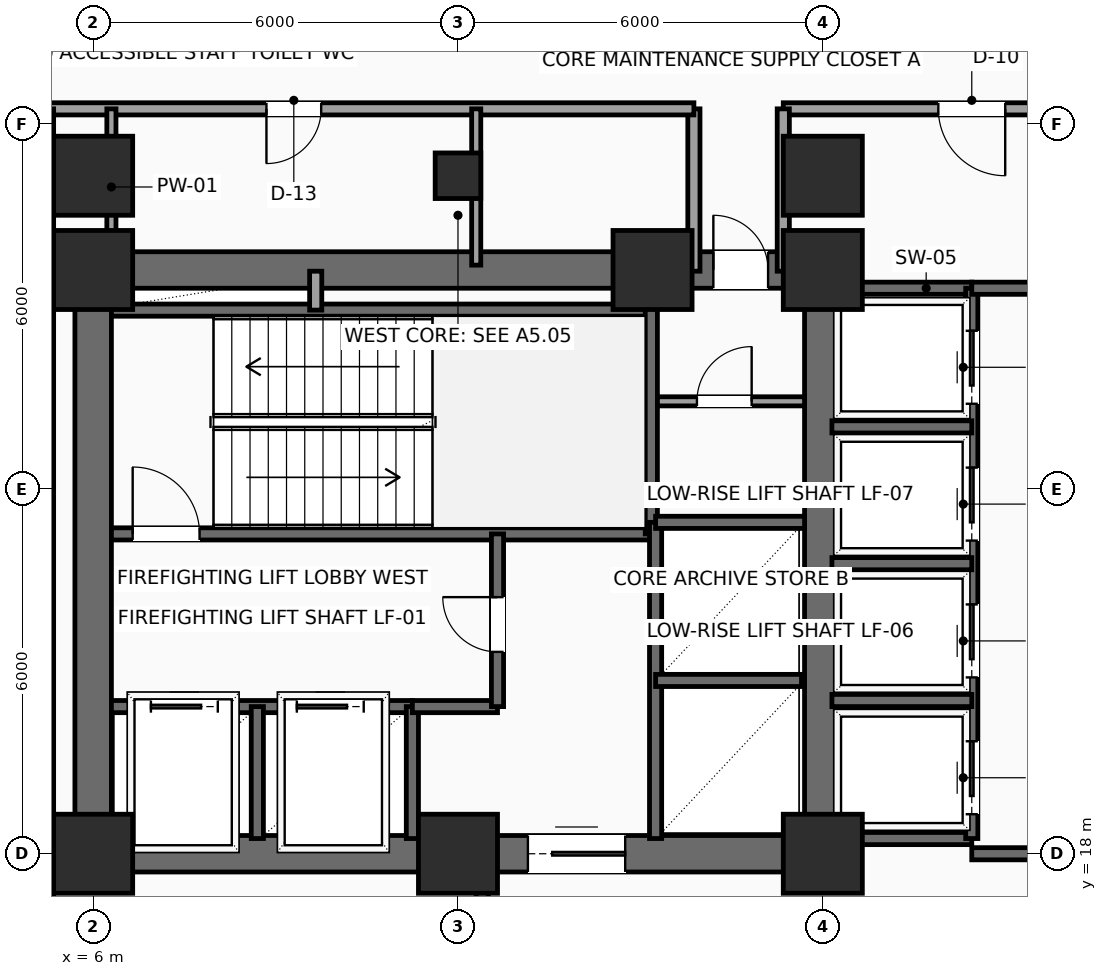
"""IFC4 building model, lengths in metres.
Left out: names, types, materials, properties, quantities, classifications, styles, units other than length and angle.
Written with IfcOpenShell. Run it as: python <this file> out.ifc"""

import sys

from ifc_helpers import new_model, si_unit, direction, frame, frame_2d, origin, origin_2d, place, context, subcontext, project, spatial, rectangle, hollow_rectangle, extrude, element, fill, save


model = new_model("IFC4")
c1 = context("Model", 3, precision=1e-05, world=origin(), true_north=direction((0.0, 1.0)))
c2 = subcontext(c1, "Body", "Model", "MODEL_VIEW")
j1 = project(units=[si_unit("LENGTHUNIT", "METRE"), si_unit("PLANEANGLEUNIT", "RADIAN")], contexts=[c1])
p1 = place(None, origin())
s1 = spatial("IfcSite", under=j1, at=p1, CompositionType="ELEMENT")
p2 = place(p1, origin())
s2 = spatial("IfcBuilding", under=s1, at=p2, CompositionType="ELEMENT")
p3 = place(p2, frame((0.0, 0.0, 83.1)))
s3 = spatial("IfcBuildingStorey", under=s2, at=p3, CompositionType="ELEMENT", Elevation=83.1)
for number, where, z_axis, x_axis in (
    (1, (6.0, 18.0, 0.0), (0.0, 0.0, 1.0), (1.0, 0.0, 0.0)),
    (2, (12.0, 18.0, 0.0), (0.0, 0.0, 1.0), (1.0, 0.0, 0.0)),
    (3, (18.0, 18.0, 0.0), (0.0, 0.0, 1.0), (1.0, 0.0, 0.0)),
    (4, (6.0, 27.6, 0.0), (0.0, 0.0, 1.0), (1.0, 0.0, 0.0)),
    (5, (15.2, 27.6, 0.0), (0.0, 0.0, 1.0), (1.0, 0.0, 0.0)),
    (6, (18.0, 27.6, 0.0), (0.0, 0.0, 1.0), (1.0, 0.0, 0.0)),
    (7, (6.0, 29.15, 0.0), (0.0, 0.0, 1.0), (1.0, 0.0, 0.0)),
):
    element("IfcColumn", number, at=place(p3, frame(where, z_axis=z_axis, x_axis=x_axis)), inside=s3, PredefinedType="COLUMN", context=c2, shape_type="SweptSolid", body=[
        extrude(rectangle(XDim=1.3, YDim=1.3, at=origin_2d()), origin(), (0.0, 0.0, 1.0), 3.9),
    ])
p4 = place(p3, frame((12.0, 29.15, 0.0), z_axis=(0.0, 0.0, 1.0), x_axis=(1.0, 0.0, 0.0)))
e8 = element("IfcColumn", 8, at=p4, inside=s3, PredefinedType="COLUMN", context=c2, shape_type="SweptSolid", body=[
    extrude(hollow_rectangle(XDim=0.75, YDim=0.75, WallThickness=0.035, InnerFilletRadius=0.035, OuterFilletRadius=0.05, at=origin_2d()), origin(), (0.0, 0.0, 1.0), 3.9),
])
p5 = place(p3, frame((18.0, 29.15, 0.0), z_axis=(0.0, 0.0, 1.0), x_axis=(1.0, 0.0, 0.0)))
e9 = element("IfcColumn", 9, at=p5, inside=s3, PredefinedType="COLUMN", context=c2, shape_type="SweptSolid", body=[
    extrude(rectangle(XDim=1.3, YDim=1.3, at=origin_2d()), origin(), (0.0, 0.0, 1.0), 3.9),
])
p6 = place(p3, frame((6.0, 18.0, 0.0), z_axis=(0.0, 0.0, 1.0), x_axis=(1.0, 0.0, 0.0)))
e10 = element("IfcWall", 10, at=p6, inside=s3, PredefinedType="SHEAR", context=c2, shape_type="SweptSolid", body=[
    extrude(rectangle(XDim=12.0, YDim=0.6, at=frame_2d((6.0, 0.0))), origin(), (0.0, 0.0, 1.0), 3.65),
])
p7 = place(p6, frame((7.15, 0.0, 0.0)))
e11 = element("IfcOpeningElement", 11, at=p7, cuts=e10, PredefinedType="OPENING", context=c2, shape_type="SweptSolid", body=[
    extrude(rectangle(XDim=1.6, YDim=2.3, at=frame_2d((0.8, 1.15))), frame((0.0, 0.31, 0.0), z_axis=(0.0, -1.0, 0.0), x_axis=(1.0, 0.0, 0.0)), (0.0, 0.0, 1.0), 0.62),
])
p8 = place(p3, frame((6.0, 27.6, 0.0), z_axis=(0.0, 0.0, 1.0), x_axis=(1.0, 0.0, 0.0)))
e12 = element("IfcWall", 12, at=p8, inside=s3, PredefinedType="SHEAR", context=c2, shape_type="SweptSolid", body=[
    extrude(rectangle(XDim=12.0, YDim=0.6, at=frame_2d((6.0, 0.0))), origin(), (0.0, 0.0, 1.0), 3.65),
])
p9 = place(p8, frame((10.2, 0.0, 0.0)))
e13 = element("IfcOpeningElement", 13, at=p9, cuts=e12, PredefinedType="OPENING", context=c2, shape_type="SweptSolid", body=[
    extrude(rectangle(XDim=0.9, YDim=2.15, at=frame_2d((0.45, 1.075))), frame((0.0, 0.31, 0.0), z_axis=(0.0, -1.0, 0.0), x_axis=(1.0, 0.0, 0.0)), (0.0, 0.0, 1.0), 0.62),
])
for number, where, z_axis, x_axis in (
    (14, (6.0, 18.0, 0.0), (0.0, 0.0, 1.0), (0.0, 1.0, 0.0)),
    (15, (18.0, 18.0, 0.0), (0.0, 0.0, 1.0), (0.0, 1.0, 0.0)),
):
    element("IfcWall", number, at=place(p3, frame(where, z_axis=z_axis, x_axis=x_axis)), inside=s3, PredefinedType="SHEAR", context=c2, shape_type="SweptSolid", body=[
        extrude(rectangle(XDim=9.6, YDim=0.6, at=frame_2d((4.8, 0.0))), origin(), (0.0, 0.0, 1.0), 3.65),
    ])
p10 = place(p3, frame((6.3, 23.26, 0.0), z_axis=(0.0, 0.0, 1.0), x_axis=(1.0, 0.0, 0.0)))
e16 = element("IfcWall", 16, at=p10, inside=s3, PredefinedType="SHEAR", context=c2, shape_type="SweptSolid", body=[
    extrude(rectangle(XDim=8.88, YDim=0.2, at=frame_2d((4.44, 0.0))), origin(), (0.0, 0.0, 1.0), 3.65),
])
p11 = place(p10, frame((0.35, 0.0, 0.0)))
e17 = element("IfcOpeningElement", 17, at=p11, cuts=e16, PredefinedType="OPENING", context=c2, shape_type="SweptSolid", body=[
    extrude(rectangle(XDim=1.1, YDim=2.2, at=frame_2d((0.55, 1.1))), frame((0.0, 0.11, 0.0), z_axis=(0.0, -1.0, 0.0), x_axis=(1.0, 0.0, 0.0)), (0.0, 0.0, 1.0), 0.22),
])
p12 = place(p3, frame((6.3, 26.94, 0.0), z_axis=(0.0, 0.0, 1.0), x_axis=(1.0, 0.0, 0.0)))
e18 = element("IfcWall", 18, at=p12, inside=s3, PredefinedType="SHEAR", context=c2, shape_type="SweptSolid", body=[
    extrude(rectangle(XDim=8.88, YDim=0.2, at=frame_2d((4.44, 0.0))), origin(), (0.0, 0.0, 1.0), 3.65),
])
p13 = place(p3, frame((15.18, 23.26, 0.0), z_axis=(0.0, 0.0, 1.0), x_axis=(0.0, 1.0, 0.0)))
e19 = element("IfcWall", 19, at=p13, inside=s3, PredefinedType="SHEAR", context=c2, shape_type="SweptSolid", body=[
    extrude(rectangle(XDim=4.04, YDim=0.2, at=frame_2d((2.02, 0.0))), origin(), (0.0, 0.0, 1.0), 3.65),
])
p14 = place(p3, frame((6.3, 20.42, 0.0), z_axis=(0.0, 0.0, 1.0), x_axis=(1.0, 0.0, 0.0)))
e20 = element("IfcWall", 20, at=p14, inside=s3, PredefinedType="SHEAR", context=c2, shape_type="SweptSolid", body=[
    extrude(rectangle(XDim=4.95, YDim=0.2, at=frame_2d((2.475, 0.0))), origin(), (0.0, 0.0, 1.0), 3.65),
])
p15 = place(p14, frame((0.65, 0.0, 0.0)))
e21 = element("IfcOpeningElement", 21, at=p15, cuts=e20, PredefinedType="OPENING", context=c2, shape_type="SweptSolid", body=[
    extrude(rectangle(XDim=1.1, YDim=2.2, at=frame_2d((0.55, 1.1))), frame((0.0, 0.11, 0.0), z_axis=(0.0, -1.0, 0.0), x_axis=(1.0, 0.0, 0.0)), (0.0, 0.0, 1.0), 0.22),
])
p16 = place(p14, frame((3.05, 0.0, 0.0)))
e22 = element("IfcOpeningElement", 22, at=p16, cuts=e20, PredefinedType="OPENING", context=c2, shape_type="SweptSolid", body=[
    extrude(rectangle(XDim=1.1, YDim=2.2, at=frame_2d((0.55, 1.1))), frame((0.0, 0.11, 0.0), z_axis=(0.0, -1.0, 0.0), x_axis=(1.0, 0.0, 0.0)), (0.0, 0.0, 1.0), 0.22),
])
for number, where, z_axis, x_axis in (
    (23, (8.7, 18.25, 0.0), (0.0, 0.0, 1.0), (0.0, 1.0, 0.0)),
    (24, (11.25, 18.25, 0.0), (0.0, 0.0, 1.0), (0.0, 1.0, 0.0)),
):
    element("IfcWall", number, at=place(p3, frame(where, z_axis=z_axis, x_axis=x_axis)), inside=s3, PredefinedType="SHEAR", context=c2, shape_type="SweptSolid", body=[
        extrude(rectangle(XDim=2.17, YDim=0.2, at=frame_2d((1.085, 0.0))), origin(), (0.0, 0.0, 1.0), 3.65),
    ])
p17 = place(p3, frame((11.25, 20.42, 0.0), z_axis=(0.0, 0.0, 1.0), x_axis=(1.0, 0.0, 0.0)))
e25 = element("IfcWall", 25, at=p17, inside=s3, PredefinedType="SHEAR", context=c2, shape_type="SweptSolid", body=[
    extrude(rectangle(XDim=1.4, YDim=0.2, at=frame_2d((0.7, 0.0))), origin(), (0.0, 0.0, 1.0), 3.65),
])
p18 = place(p3, frame((12.65, 20.42, 0.0), z_axis=(0.0, 0.0, 1.0), x_axis=(0.0, 1.0, 0.0)))
e26 = element("IfcWall", 26, at=p18, inside=s3, PredefinedType="SHEAR", context=c2, shape_type="SweptSolid", body=[
    extrude(rectangle(XDim=2.84, YDim=0.2, at=frame_2d((1.42, 0.0))), origin(), (0.0, 0.0, 1.0), 3.65),
])
p19 = place(p18, frame((0.9, 0.0, 0.0)))
e27 = element("IfcOpeningElement", 27, at=p19, cuts=e26, PredefinedType="OPENING", context=c2, shape_type="SweptSolid", body=[
    extrude(rectangle(XDim=0.9, YDim=2.15, at=frame_2d((0.45, 1.075))), frame((0.0, 0.11, 0.0), z_axis=(0.0, -1.0, 0.0), x_axis=(1.0, 0.0, 0.0)), (0.0, 0.0, 1.0), 0.22),
])
p20 = place(p3, frame((9.66, 26.94, 0.0), z_axis=(0.0, 0.0, 1.0), x_axis=(0.0, 1.0, 0.0)))
e28 = element("IfcWall", 28, at=p20, inside=s3, PredefinedType="SOLIDWALL", context=c2, shape_type="SweptSolid", body=[
    extrude(rectangle(XDim=0.64, YDim=0.2, at=frame_2d((0.32, 0.0))), origin(), (0.0, 0.0, 1.0), 3.65),
])
p21 = place(p3, frame((15.25, 18.25, 0.0), z_axis=(0.0, 0.0, 1.0), x_axis=(0.0, 1.0, 0.0)))
e29 = element("IfcWall", 29, at=p21, inside=s3, PredefinedType="SHEAR", context=c2, shape_type="SweptSolid", body=[
    extrude(rectangle(XDim=5.2, YDim=0.2, at=frame_2d((2.6, 0.0))), origin(), (0.0, 0.0, 1.0), 3.65),
])
p22 = place(p3, frame((15.25, 20.85, 0.0), z_axis=(0.0, 0.0, 1.0), x_axis=(1.0, 0.0, 0.0)))
e30 = element("IfcWall", 30, at=p22, inside=s3, PredefinedType="SHEAR", context=c2, shape_type="SweptSolid", body=[
    extrude(rectangle(XDim=2.4, YDim=0.2, at=frame_2d((1.2, 0.0))), origin(), (0.0, 0.0, 1.0), 3.65),
])
p23 = place(p3, frame((15.25, 23.45, 0.0), z_axis=(0.0, 0.0, 1.0), x_axis=(1.0, 0.0, 0.0)))
e31 = element("IfcWall", 31, at=p23, inside=s3, PredefinedType="SHEAR", context=c2, shape_type="SweptSolid", body=[
    extrude(rectangle(XDim=2.45, YDim=0.2, at=frame_2d((1.225, 0.0))), origin(), (0.0, 0.0, 1.0), 3.65),
])
p24 = place(p3, frame((15.28, 25.44, 0.0), z_axis=(0.0, 0.0, 1.0), x_axis=(1.0, 0.0, 0.0)))
e32 = element("IfcWall", 32, at=p24, inside=s3, PredefinedType="PARTITIONING", context=c2, shape_type="SweptSolid", body=[
    extrude(rectangle(XDim=2.42, YDim=0.15, at=frame_2d((1.21, 0.0))), origin(), (0.0, 0.0, 1.0), 3.65),
])
p25 = place(p24, frame((0.65, 0.0, 0.0)))
e33 = element("IfcOpeningElement", 33, at=p25, cuts=e32, PredefinedType="OPENING", context=c2, shape_type="SweptSolid", body=[
    extrude(rectangle(XDim=0.9, YDim=2.15, at=frame_2d((0.45, 1.075))), frame((0.0, 0.085, 0.0), z_axis=(0.0, -1.0, 0.0), x_axis=(1.0, 0.0, 0.0)), (0.0, 0.0, 1.0), 0.17),
])
for number, where, z_axis, x_axis in (
    (34, (18.1, 27.3, 0.0), (0.0, 0.0, 1.0), (1.0, 0.0, 0.0)),
    (35, (18.1, 18.25, 0.0), (0.0, 0.0, 1.0), (1.0, 0.0, 0.0)),
):
    element("IfcWall", number, at=place(p3, frame(where, z_axis=z_axis, x_axis=x_axis)), inside=s3, PredefinedType="SHEAR", context=c2, shape_type="SweptSolid", body=[
        extrude(rectangle(XDim=2.35, YDim=0.2, at=frame_2d((1.175, 0.0))), origin(), (0.0, 0.0, 1.0), 3.65),
    ])
p26 = place(p3, frame((20.45, 18.25, 0.0), z_axis=(0.0, 0.0, 1.0), x_axis=(0.0, 1.0, 0.0)))
e36 = element("IfcWall", 36, at=p26, inside=s3, PredefinedType="SHEAR", context=c2, shape_type="SweptSolid", body=[
    extrude(rectangle(XDim=9.05, YDim=0.2, at=frame_2d((4.525, 0.0))), origin(), (0.0, 0.0, 1.0), 3.65),
])
p27 = place(p26, frame((0.4, 0.0, 0.0)))
e37 = element("IfcOpeningElement", 37, at=p27, cuts=e36, PredefinedType="OPENING", context=c2, shape_type="SweptSolid", body=[
    extrude(rectangle(XDim=1.2, YDim=2.2, at=frame_2d((0.6, 1.1))), frame((0.0, 0.11, 0.0), z_axis=(0.0, -1.0, 0.0), x_axis=(1.0, 0.0, 0.0)), (0.0, 0.0, 1.0), 0.22),
])
p28 = place(p26, frame((2.65, 0.0, 0.0)))
e38 = element("IfcOpeningElement", 38, at=p28, cuts=e36, PredefinedType="OPENING", context=c2, shape_type="SweptSolid", body=[
    extrude(rectangle(XDim=1.2, YDim=2.2, at=frame_2d((0.6, 1.1))), frame((0.0, 0.11, 0.0), z_axis=(0.0, -1.0, 0.0), x_axis=(1.0, 0.0, 0.0)), (0.0, 0.0, 1.0), 0.22),
])
p29 = place(p26, frame((4.9, 0.0, 0.0)))
e39 = element("IfcOpeningElement", 39, at=p29, cuts=e36, PredefinedType="OPENING", context=c2, shape_type="SweptSolid", body=[
    extrude(rectangle(XDim=1.2, YDim=2.2, at=frame_2d((0.6, 1.1))), frame((0.0, 0.11, 0.0), z_axis=(0.0, -1.0, 0.0), x_axis=(1.0, 0.0, 0.0)), (0.0, 0.0, 1.0), 0.22),
])
p30 = place(p26, frame((7.15, 0.0, 0.0)))
e40 = element("IfcOpeningElement", 40, at=p30, cuts=e36, PredefinedType="OPENING", context=c2, shape_type="SweptSolid", body=[
    extrude(rectangle(XDim=1.2, YDim=2.2, at=frame_2d((0.6, 1.1))), frame((0.0, 0.11, 0.0), z_axis=(0.0, -1.0, 0.0), x_axis=(1.0, 0.0, 0.0)), (0.0, 0.0, 1.0), 0.22),
])
for number, where, z_axis, x_axis in (
    (41, (18.15, 20.52, 0.0), (0.0, 0.0, 1.0), (1.0, 0.0, 0.0)),
    (42, (18.15, 22.77, 0.0), (0.0, 0.0, 1.0), (1.0, 0.0, 0.0)),
    (43, (18.15, 25.02, 0.0), (0.0, 0.0, 1.0), (1.0, 0.0, 0.0)),
):
    element("IfcWall", number, at=place(p3, frame(where, z_axis=z_axis, x_axis=x_axis)), inside=s3, PredefinedType="SHEAR", context=c2, shape_type="SweptSolid", body=[
        extrude(rectangle(XDim=2.3, YDim=0.2, at=frame_2d((1.15, 0.0))), origin(), (0.0, 0.0, 1.0), 3.65),
    ])
p31 = place(p3, frame((20.45, 18.0, 0.0), z_axis=(0.0, 0.0, 1.0), x_axis=(1.0, 0.0, 0.0)))
e44 = element("IfcWall", 44, at=p31, inside=s3, PredefinedType="SHEAR", context=c2, shape_type="SweptSolid", body=[
    extrude(rectangle(XDim=3.5, YDim=0.2, at=frame_2d((1.75, 0.0))), origin(), (0.0, 0.0, 1.0), 3.65),
])
p32 = place(p31, frame((0.95, 0.0, 0.0)))
e45 = element("IfcOpeningElement", 45, at=p32, cuts=e44, PredefinedType="OPENING", context=c2, shape_type="SweptSolid", body=[
    extrude(rectangle(XDim=1.6, YDim=2.3, at=frame_2d((0.8, 1.15))), frame((0.0, 0.11, 0.0), z_axis=(0.0, -1.0, 0.0), x_axis=(1.0, 0.0, 0.0)), (0.0, 0.0, 1.0), 0.22),
])
p33 = place(p3, frame((20.45, 27.3, 0.0), z_axis=(0.0, 0.0, 1.0), x_axis=(1.0, 0.0, 0.0)))
e46 = element("IfcWall", 46, at=p33, inside=s3, PredefinedType="SHEAR", context=c2, shape_type="SweptSolid", body=[
    extrude(rectangle(XDim=3.5, YDim=0.2, at=frame_2d((1.75, 0.0))), origin(), (0.0, 0.0, 1.0), 3.65),
])
p34 = place(p3, frame((23.7, 30.25, 0.0), z_axis=(0.0, 0.0, 1.0), x_axis=(-1.0, 0.0, 0.0)))
e47 = element("IfcWall", 47, at=p34, inside=s3, PredefinedType="PARTITIONING", context=c2, shape_type="SweptSolid", body=[
    extrude(rectangle(XDim=6.35, YDim=0.2, at=frame_2d((3.175, 0.0))), origin(), (0.0, 0.0, 1.0), 3.65),
])
p35 = place(p34, frame((2.7, 0.0, 0.0)))
e48 = element("IfcOpeningElement", 48, at=p35, cuts=e47, PredefinedType="OPENING", context=c2, shape_type="SweptSolid", body=[
    extrude(rectangle(XDim=1.1, YDim=2.25, at=frame_2d((0.55, 1.125))), frame((0.0, 0.11, 0.0), z_axis=(0.0, -1.0, 0.0), x_axis=(1.0, 0.0, 0.0)), (0.0, 0.0, 1.0), 0.22),
])
for number, where, z_axis, x_axis in (
    (49, (17.35, 30.25, 0.0), (0.0, 0.0, 1.0), (0.0, -1.0, 0.0)),
    (50, (15.88, 27.58, 0.0), (0.0, 0.0, 1.0), (0.0, 1.0, 0.0)),
):
    element("IfcWall", number, at=place(p3, frame(where, z_axis=z_axis, x_axis=x_axis)), inside=s3, PredefinedType="PARTITIONING", context=c2, shape_type="SweptSolid", body=[
        extrude(rectangle(XDim=2.67, YDim=0.2, at=frame_2d((1.335, 0.0))), origin(), (0.0, 0.0, 1.0), 3.65),
    ])
p36 = place(p3, frame((15.88, 30.25, 0.0), z_axis=(0.0, 0.0, 1.0), x_axis=(-1.0, 0.0, 0.0)))
e51 = element("IfcWall", 51, at=p36, inside=s3, PredefinedType="PARTITIONING", context=c2, shape_type="SweptSolid", body=[
    extrude(rectangle(XDim=10.63, YDim=0.2, at=frame_2d((5.315, 0.0))), origin(), (0.0, 0.0, 1.0), 3.65),
])
p37 = place(p36, frame((6.13, 0.0, 0.0)))
e52 = element("IfcOpeningElement", 52, at=p37, cuts=e51, PredefinedType="OPENING", context=c2, shape_type="SweptSolid", body=[
    extrude(rectangle(XDim=0.9, YDim=2.1, at=frame_2d((0.45, 1.05))), frame((0.0, 0.11, 0.0), z_axis=(0.0, -1.0, 0.0), x_axis=(1.0, 0.0, 0.0)), (0.0, 0.0, 1.0), 0.22),
])
p38 = place(p3, frame((5.25, 30.25, 0.0), z_axis=(0.0, 0.0, 1.0), x_axis=(0.0, -1.0, 0.0)))
e53 = element("IfcWall", 53, at=p38, inside=s3, PredefinedType="PARTITIONING", context=c2, shape_type="SweptSolid", body=[
    extrude(rectangle(XDim=14.1, YDim=0.2, at=frame_2d((7.05, 0.0))), origin(), (0.0, 0.0, 1.0), 3.65),
])
p39 = place(p3, frame((12.4, 16.15, 0.0), z_axis=(0.0, 0.0, 1.0), x_axis=(0.0, 1.0, 0.0)))
e54 = element("IfcWall", 54, at=p39, inside=s3, PredefinedType="PARTITIONING", context=c2, shape_type="SweptSolid", body=[
    extrude(rectangle(XDim=1.8, YDim=0.2, at=frame_2d((0.9, 0.0))), origin(), (0.0, 0.0, 1.0), 3.65),
])
for number, where, z_axis, x_axis in (
    (55, (6.3, 27.68, 0.0), (0.0, 0.0, 1.0), (0.0, 1.0, 0.0)),
    (56, (12.3, 27.68, 0.0), (0.0, 0.0, 1.0), (0.0, 1.0, 0.0)),
):
    element("IfcWall", number, at=place(p3, frame(where, z_axis=z_axis, x_axis=x_axis)), inside=s3, PredefinedType="PARTITIONING", context=c2, shape_type="SweptSolid", body=[
        extrude(rectangle(XDim=2.57, YDim=0.15, at=frame_2d((1.285, 0.0))), origin(), (0.0, 0.0, 1.0), 2.992),
    ])
p40 = place(p7, origin())
e57 = element("IfcDoor", 57, at=p40, inside=s3, OperationType="DOUBLE_DOOR_SLIDING", PredefinedType="DOOR", context=c2, shape_type="SweptSolid", body=[
    extrude(rectangle(XDim=1.6, YDim=2.3, at=frame_2d((0.8, 1.15))), frame((0.0, 0.025, 0.0), z_axis=(0.0, -1.0, 0.0), x_axis=(1.0, 0.0, 0.0)), (0.0, 0.0, 1.0), 0.05),
])
fill(e11, e57)
p41 = place(p9, origin())
e58 = element("IfcDoor", 58, at=p41, inside=s3, OperationType="SINGLE_SWING_LEFT", PredefinedType="DOOR", context=c2, shape_type="SweptSolid", body=[
    extrude(rectangle(XDim=0.9, YDim=2.15, at=frame_2d((0.45, 1.075))), frame((0.0, 0.025, 0.0), z_axis=(0.0, -1.0, 0.0), x_axis=(1.0, 0.0, 0.0)), (0.0, 0.0, 1.0), 0.05),
])
fill(e13, e58)
p42 = place(p11, origin())
e59 = element("IfcDoor", 59, at=p42, inside=s3, OperationType="SINGLE_SWING_LEFT", PredefinedType="DOOR", context=c2, shape_type="SweptSolid", body=[
    extrude(rectangle(XDim=1.1, YDim=2.2, at=frame_2d((0.55, 1.1))), frame((0.0, 0.025, 0.0), z_axis=(0.0, -1.0, 0.0), x_axis=(1.0, 0.0, 0.0)), (0.0, 0.0, 1.0), 0.05),
])
fill(e17, e59)
p43 = place(p15, origin())
e60 = element("IfcDoor", 60, at=p43, inside=s3, OperationType="SLIDING_TO_LEFT", PredefinedType="DOOR", context=c2, shape_type="SweptSolid", body=[
    extrude(rectangle(XDim=1.1, YDim=2.2, at=frame_2d((0.55, 1.1))), frame((0.0, 0.025, 0.0), z_axis=(0.0, -1.0, 0.0), x_axis=(1.0, 0.0, 0.0)), (0.0, 0.0, 1.0), 0.05),
])
fill(e21, e60)
p44 = place(p16, origin())
e61 = element("IfcDoor", 61, at=p44, inside=s3, OperationType="SLIDING_TO_LEFT", PredefinedType="DOOR", context=c2, shape_type="SweptSolid", body=[
    extrude(rectangle(XDim=1.1, YDim=2.2, at=frame_2d((0.55, 1.1))), frame((0.0, 0.025, 0.0), z_axis=(0.0, -1.0, 0.0), x_axis=(1.0, 0.0, 0.0)), (0.0, 0.0, 1.0), 0.05),
])
fill(e22, e61)
p45 = place(p19, origin())
e62 = element("IfcDoor", 62, at=p45, inside=s3, OperationType="SINGLE_SWING_RIGHT", PredefinedType="DOOR", context=c2, shape_type="SweptSolid", body=[
    extrude(rectangle(XDim=0.9, YDim=2.15, at=frame_2d((0.45, 1.075))), frame((0.0, 0.025, 0.0), z_axis=(0.0, -1.0, 0.0), x_axis=(1.0, 0.0, 0.0)), (0.0, 0.0, 1.0), 0.05),
])
fill(e27, e62)
p46 = place(p25, origin())
e63 = element("IfcDoor", 63, at=p46, inside=s3, OperationType="SINGLE_SWING_RIGHT", PredefinedType="DOOR", context=c2, shape_type="SweptSolid", body=[
    extrude(rectangle(XDim=0.9, YDim=2.15, at=frame_2d((0.45, 1.075))), frame((0.0, 0.025, 0.0), z_axis=(0.0, -1.0, 0.0), x_axis=(1.0, 0.0, 0.0)), (0.0, 0.0, 1.0), 0.05),
])
fill(e33, e63)
p47 = place(p27, origin())
e64 = element("IfcDoor", 64, at=p47, inside=s3, OperationType="SLIDING_TO_RIGHT", PredefinedType="DOOR", context=c2, shape_type="SweptSolid", body=[
    extrude(rectangle(XDim=1.2, YDim=2.2, at=frame_2d((0.6, 1.1))), frame((0.0, 0.025, 0.0), z_axis=(0.0, -1.0, 0.0), x_axis=(1.0, 0.0, 0.0)), (0.0, 0.0, 1.0), 0.05),
])
fill(e37, e64)
p48 = place(p28, origin())
e65 = element("IfcDoor", 65, at=p48, inside=s3, OperationType="SLIDING_TO_RIGHT", PredefinedType="DOOR", context=c2, shape_type="SweptSolid", body=[
    extrude(rectangle(XDim=1.2, YDim=2.2, at=frame_2d((0.6, 1.1))), frame((0.0, 0.025, 0.0), z_axis=(0.0, -1.0, 0.0), x_axis=(1.0, 0.0, 0.0)), (0.0, 0.0, 1.0), 0.05),
])
fill(e38, e65)
p49 = place(p29, origin())
e66 = element("IfcDoor", 66, at=p49, inside=s3, OperationType="SLIDING_TO_RIGHT", PredefinedType="DOOR", context=c2, shape_type="SweptSolid", body=[
    extrude(rectangle(XDim=1.2, YDim=2.2, at=frame_2d((0.6, 1.1))), frame((0.0, 0.025, 0.0), z_axis=(0.0, -1.0, 0.0), x_axis=(1.0, 0.0, 0.0)), (0.0, 0.0, 1.0), 0.05),
])
fill(e39, e66)
p50 = place(p30, origin())
e67 = element("IfcDoor", 67, at=p50, inside=s3, OperationType="SLIDING_TO_RIGHT", PredefinedType="DOOR", context=c2, shape_type="SweptSolid", body=[
    extrude(rectangle(XDim=1.2, YDim=2.2, at=frame_2d((0.6, 1.1))), frame((0.0, 0.025, 0.0), z_axis=(0.0, -1.0, 0.0), x_axis=(1.0, 0.0, 0.0)), (0.0, 0.0, 1.0), 0.05),
])
fill(e40, e67)
p51 = place(p35, origin())
e68 = element("IfcDoor", 68, at=p51, inside=s3, OperationType="SINGLE_SWING_LEFT", PredefinedType="DOOR", context=c2, shape_type="SweptSolid", body=[
    extrude(rectangle(XDim=1.1, YDim=2.25, at=frame_2d((0.55, 1.125))), frame((0.0, 0.025, 0.0), z_axis=(0.0, -1.0, 0.0), x_axis=(1.0, 0.0, 0.0)), (0.0, 0.0, 1.0), 0.05),
])
fill(e48, e68)
p52 = place(p37, origin())
e69 = element("IfcDoor", 69, at=p52, inside=s3, OperationType="SINGLE_SWING_RIGHT", PredefinedType="DOOR", context=c2, shape_type="SweptSolid", body=[
    extrude(rectangle(XDim=0.9, YDim=2.1, at=frame_2d((0.45, 1.05))), frame((0.0, 0.025, 0.0), z_axis=(0.0, -1.0, 0.0), x_axis=(1.0, 0.0, 0.0)), (0.0, 0.0, 1.0), 0.05),
])
fill(e52, e69)
save(model, sys.argv[1])
